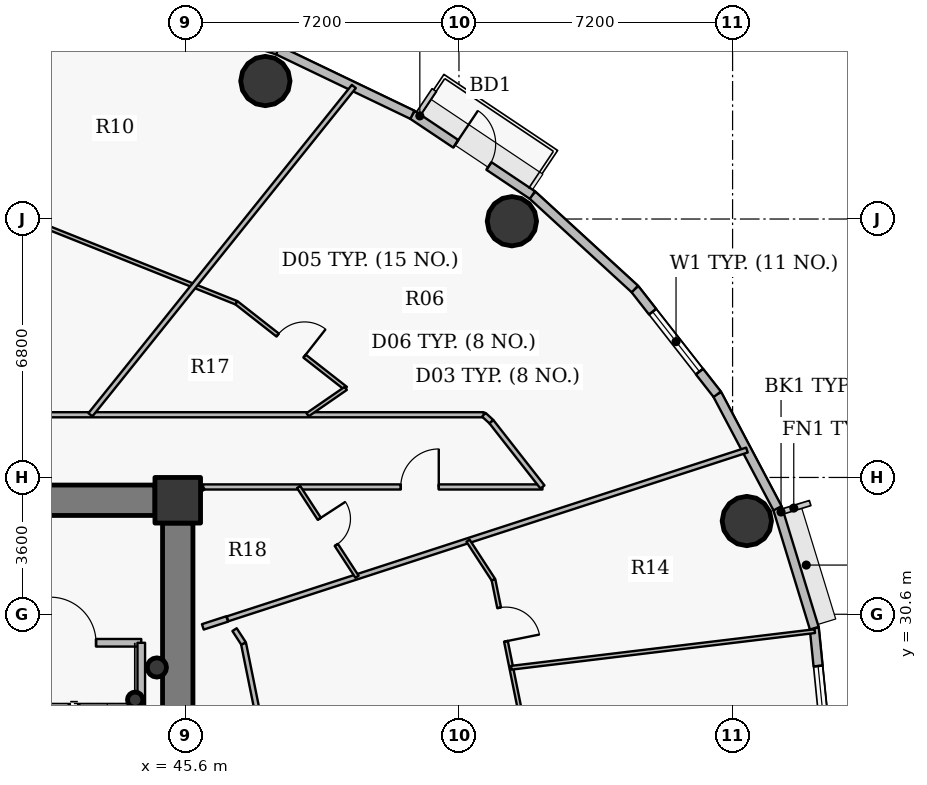
"""IFC4 building model, lengths in metres.
Left out: names, types, materials, properties, quantities, classifications, styles, units other than length and angle.
Written with IfcOpenShell. Run it as: python <this file> out.ifc"""

import sys

from ifc_helpers import new_model, si_unit, direction, frame, frame_2d, origin, origin_2d, place, context, subcontext, project, spatial, rectangle, hollow_circle, extrude, source, transform, mapped, element, fill, save


model = new_model("IFC4")
c1 = context("Model", 3, precision=1e-05, world=origin(), true_north=direction((0.0, 1.0)))
c2 = subcontext(c1, "Body", "Model", "MODEL_VIEW")
j1 = project(units=[si_unit("LENGTHUNIT", "METRE"), si_unit("PLANEANGLEUNIT", "RADIAN")], contexts=[c1])
p1 = place(None, origin())
s1 = spatial("IfcSite", under=j1, at=p1, CompositionType="ELEMENT")
p2 = place(p1, origin())
s2 = spatial("IfcBuilding", under=s1, at=p2, CompositionType="ELEMENT")
p3 = place(p2, frame((0.0, 0.0, 163.65)))
s3 = spatial("IfcBuildingStorey", under=s2, at=p3, CompositionType="ELEMENT", Elevation=163.65)
p4 = place(p3, frame((45.4, 33.6, 0.0), z_axis=(0.0, 0.0, 1.0), x_axis=(1.0, 0.0, 0.0)))
e1 = element("IfcColumn", 1, at=p4, inside=s3, PredefinedType="COLUMN", context=c2, shape_type="SweptSolid", body=[
    extrude(rectangle(XDim=1.2, YDim=1.2, at=origin_2d()), origin(), (0.0, 0.0, 1.0), 3.75),
])
p5 = place(p3, frame((44.28, 28.35, 0.0), z_axis=(0.0, 0.0, 1.0), x_axis=(1.0, 0.0, 0.0)))
e2 = element("IfcColumn", 2, at=p5, inside=s3, PredefinedType="COLUMN", context=c2, shape_type="SweptSolid", body=[
    extrude(hollow_circle(Radius=0.203, WallThickness=0.016, at=origin_2d()), origin(), (0.0, 0.0, 1.0), 3.75),
])
p6 = place(p3, frame((27.2, 33.6, 0.0), z_axis=(0.0, 0.0, 1.0), x_axis=(1.0, 0.0, 0.0)))
e3 = element("IfcWall", 3, at=p6, inside=s3, PredefinedType="SHEAR", context=c2, shape_type="SweptSolid", body=[
    extrude(rectangle(XDim=17.6, YDim=0.8, at=frame_2d((8.8, 0.0))), origin(), (0.0, 0.0, 1.0), 2.95),
])
p7 = place(p6, frame((13.45, 0.0, 0.0)))
e4 = element("IfcOpeningElement", 4, at=p7, cuts=e3, PredefinedType="OPENING", context=c2, shape_type="SweptSolid", body=[
    extrude(rectangle(XDim=1.15, YDim=2.15, at=origin_2d()), frame((0.575, 0.41, 1.075), z_axis=(0.0, -1.0, 0.0), x_axis=(1.0, 0.0, 0.0)), (0.0, 0.0, 1.0), 0.82),
])
p8 = place(p3, frame((45.4, 33.0, 0.0), z_axis=(0.0, 0.0, 1.0), x_axis=(0.0, -1.0, 0.0)))
e5 = element("IfcWall", 5, at=p8, inside=s3, PredefinedType="SHEAR", context=c2, shape_type="SweptSolid", body=[
    extrude(rectangle(XDim=12.0, YDim=0.8, at=frame_2d((6.0, 0.0))), origin(), (0.0, 0.0, 1.0), 2.95),
])
for number, where, z_axis, x_axis in (
    (6, (60.375, 33.053, 0.0), (0.0, 0.0, 1.0), (1.0, 0.0, 0.0)),
    (7, (54.192, 40.942, 0.0), (0.0, 0.0, 1.0), (1.0, 0.0, 0.0)),
    (8, (47.706, 44.631, 0.0), (0.0, 0.0, 1.0), (1.0, 0.0, 0.0)),
):
    element("IfcColumn", number, at=place(p3, frame(where, z_axis=z_axis, x_axis=x_axis)), inside=s3, PredefinedType="COLUMN", context=c2, shape_type="SweptSolid", body=[
        extrude(hollow_circle(Radius=0.65, WallThickness=0.04, at=origin_2d()), origin(), (0.0, 0.0, 1.0), 3.75),
    ])
p9 = place(p3, frame((44.85, 29.2, 0.0), z_axis=(0.0, 0.0, 1.0), x_axis=(1.0, 0.0, 0.0)))
e9 = element("IfcColumn", 9, at=p9, inside=s3, PredefinedType="COLUMN", context=c2, shape_type="SweptSolid", body=[
    extrude(hollow_circle(Radius=0.254, WallThickness=0.02, at=origin_2d()), origin(), (0.0, 0.0, 1.0), 3.75),
])
p10 = place(p3, frame((62.15, 30.234, 0.0), z_axis=(0.0, 0.0, 1.0), x_axis=(0.100061534614, -0.994981250723, 0.0)))
e10 = element("IfcWall", 10, at=p10, inside=s3, PredefinedType="SOLIDWALL", context=c2, shape_type="SweptSolid", body=[
    extrude(rectangle(XDim=3.25, YDim=0.24, at=frame_2d((1.625, 0.0))), origin(), (0.0, 0.0, 1.0), 3.5),
])
p11 = place(p10, frame((1.0, 0.0, 0.9)))
e11 = element("IfcOpeningElement", 11, at=p11, cuts=e10, PredefinedType="OPENING", context=c2, shape_type="SweptSolid", body=[
    extrude(rectangle(XDim=1.25, YDim=1.65, at=origin_2d()), frame((0.625, 0.13, 0.825), z_axis=(0.0, -1.0, 0.0), x_axis=(1.0, 0.0, 0.0)), (0.0, 0.0, 1.0), 0.26),
])
p12 = place(p3, frame((61.183, 33.389, 0.0), z_axis=(0.0, 0.0, 1.0), x_axis=(0.293097995113, -0.956082405058, 0.0)))
e12 = element("IfcWall", 12, at=p12, inside=s3, PredefinedType="SOLIDWALL", context=c2, shape_type="SweptSolid", body=[
    extrude(rectangle(XDim=3.3, YDim=0.24, at=frame_2d((1.65, 0.0))), origin(), (0.0, 0.0, 1.0), 3.5),
])
p13 = place(p3, frame((59.596, 36.388, 0.0), z_axis=(0.0, 0.0, 1.0), x_axis=(0.467586874938, -0.88394712194, 0.0)))
e13 = element("IfcWall", 13, at=p13, inside=s3, PredefinedType="SOLIDWALL", context=c2, shape_type="SweptSolid", body=[
    extrude(rectangle(XDim=3.393, YDim=0.24, at=frame_2d((1.697, 0.0))), origin(), (0.0, 0.0, 1.0), 3.5),
])
p14 = place(p3, frame((57.428, 39.158, 0.0), z_axis=(0.0, 0.0, 1.0), x_axis=(0.616287674549, -0.787521112224, 0.0)))
e14 = element("IfcWall", 14, at=p14, inside=s3, PredefinedType="SOLIDWALL", context=c2, shape_type="SweptSolid", body=[
    extrude(rectangle(XDim=3.517, YDim=0.24, at=frame_2d((1.759, 0.0))), origin(), (0.0, 0.0, 1.0), 3.5),
])
p15 = place(p14, frame((0.759, 0.0, 0.9)))
e15 = element("IfcOpeningElement", 15, at=p15, cuts=e14, PredefinedType="OPENING", context=c2, shape_type="SweptSolid", body=[
    extrude(rectangle(XDim=2.0, YDim=1.75, at=origin_2d()), frame((1.0, 0.13, 0.875), z_axis=(0.0, -1.0, 0.0), x_axis=(1.0, 0.0, 0.0)), (0.0, 0.0, 1.0), 0.26),
])
p16 = place(p3, frame((54.732, 41.631, 0.0), z_axis=(0.0, 0.0, 1.0), x_axis=(0.737076565834, -0.675809245349, 0.0)))
e16 = element("IfcWall", 16, at=p16, inside=s3, PredefinedType="SOLIDWALL", context=c2, shape_type="SweptSolid", body=[
    extrude(rectangle(XDim=3.658, YDim=0.24, at=frame_2d((1.829, 0.0))), origin(), (0.0, 0.0, 1.0), 3.5),
])
p17 = place(p3, frame((51.573, 43.743, 0.0), z_axis=(0.0, 0.0, 1.0), x_axis=(0.831228998277, -0.555930168657, 0.0)))
e17 = element("IfcWall", 17, at=p17, inside=s3, PredefinedType="SOLIDWALL", context=c2, shape_type="SweptSolid", body=[
    extrude(rectangle(XDim=3.8, YDim=0.24, at=frame_2d((1.9, 0.0))), origin(), (0.0, 0.0, 1.0), 3.5),
])
p18 = place(p17, frame((1.375, 0.0, 0.0)))
e18 = element("IfcOpeningElement", 18, at=p18, cuts=e17, PredefinedType="OPENING", context=c2, shape_type="SweptSolid", body=[
    extrude(rectangle(XDim=1.05, YDim=2.15, at=origin_2d()), frame((0.525, 0.13, 1.075), z_axis=(0.0, -1.0, 0.0), x_axis=(1.0, 0.0, 0.0)), (0.0, 0.0, 1.0), 0.26),
])
p19 = place(p3, frame((48.03, 45.444, 0.0), z_axis=(0.0, 0.0, 1.0), x_axis=(0.901564733809, -0.432644231155, 0.0)))
e19 = element("IfcWall", 19, at=p19, inside=s3, PredefinedType="SOLIDWALL", context=c2, shape_type="SweptSolid", body=[
    extrude(rectangle(XDim=3.93, YDim=0.24, at=frame_2d((1.965, 0.0))), origin(), (0.0, 0.0, 1.0), 3.5),
])
p20 = place(p3, frame((44.189, 46.689, 0.0), z_axis=(0.0, 0.0, 1.0), x_axis=(0.951209870236, -0.30854462038, 0.0)))
e20 = element("IfcWall", 20, at=p20, inside=s3, PredefinedType="SOLIDWALL", context=c2, shape_type="SweptSolid", body=[
    extrude(rectangle(XDim=4.038, YDim=0.24, at=frame_2d((2.019, 0.0))), origin(), (0.0, 0.0, 1.0), 3.5),
])
p21 = place(p20, frame((1.019, 0.0, 0.9)))
e21 = element("IfcOpeningElement", 21, at=p21, cuts=e20, PredefinedType="OPENING", context=c2, shape_type="SweptSolid", body=[
    extrude(rectangle(XDim=2.0, YDim=1.75, at=origin_2d()), frame((1.0, 0.13, 0.875), z_axis=(0.0, -1.0, 0.0), x_axis=(1.0, 0.0, 0.0)), (0.0, 0.0, 1.0), 0.26),
])
p22 = place(p3, frame((24.35, 35.85, 0.0), z_axis=(0.0, 0.0, 1.0), x_axis=(1.0, 0.0, 0.0)))
e22 = element("IfcWall", 22, at=p22, inside=s3, PredefinedType="PARTITIONING", context=c2, shape_type="SweptSolid", body=[
    extrude(rectangle(XDim=29.104, YDim=0.135, at=frame_2d((14.552, 0.0))), origin(), (0.0, 0.0, 1.0), 2.935),
])
p23 = place(p22, frame((15.972, 0.0, 0.0)))
e23 = element("IfcOpeningElement", 23, at=p23, cuts=e22, PredefinedType="OPENING", context=c2, shape_type="SweptSolid", body=[
    extrude(rectangle(XDim=1.0, YDim=2.15, at=origin_2d()), frame((0.5, 0.078, 1.075), z_axis=(0.0, -1.0, 0.0), x_axis=(1.0, 0.0, 0.0)), (0.0, 0.0, 1.0), 0.155),
])
p24 = place(p22, frame((4.074, 0.0, 0.0)))
e24 = element("IfcOpeningElement", 24, at=p24, cuts=e22, PredefinedType="OPENING", context=c2, shape_type="SweptSolid", body=[
    extrude(rectangle(XDim=1.0, YDim=2.15, at=origin_2d()), frame((0.5, 0.078, 1.075), z_axis=(0.0, -1.0, 0.0), x_axis=(1.0, 0.0, 0.0)), (0.0, 0.0, 1.0), 0.155),
])
p25 = place(p3, frame((35.95, 29.85, 0.0), z_axis=(0.0, 0.0, 1.0), x_axis=(1.0, 0.0, 0.0)))
e25 = element("IfcWall", 25, at=p25, inside=s3, PredefinedType="PARTITIONING", context=c2, shape_type="SweptSolid", body=[
    extrude(rectangle(XDim=8.49, YDim=0.2, at=frame_2d((4.245, 0.0))), origin(), (0.0, 0.0, 1.0), 3.085),
])
p26 = place(p25, frame((6.1, 0.0, 0.0)))
e26 = element("IfcOpeningElement", 26, at=p26, cuts=e25, PredefinedType="OPENING", context=c2, shape_type="SweptSolid", body=[
    extrude(rectangle(XDim=1.2, YDim=2.15, at=origin_2d()), frame((0.6, 0.11, 1.075), z_axis=(0.0, -1.0, 0.0), x_axis=(1.0, 0.0, 0.0)), (0.0, 0.0, 1.0), 0.22),
])
p27 = place(p25, frame((0.37, 0.0, 0.0)))
e27 = element("IfcOpeningElement", 27, at=p27, cuts=e25, PredefinedType="OPENING", context=c2, shape_type="SweptSolid", body=[
    extrude(rectangle(XDim=1.15, YDim=2.15, at=origin_2d()), frame((0.575, 0.11, 1.075), z_axis=(0.0, -1.0, 0.0), x_axis=(1.0, 0.0, 0.0)), (0.0, 0.0, 1.0), 0.22),
])
p28 = place(p25, frame((2.425, 0.0, 0.0)))
e28 = element("IfcOpeningElement", 28, at=p28, cuts=e25, PredefinedType="OPENING", context=c2, shape_type="SweptSolid", body=[
    extrude(rectangle(XDim=1.05, YDim=2.15, at=origin_2d()), frame((0.525, 0.11, 1.075), z_axis=(0.0, -1.0, 0.0), x_axis=(1.0, 0.0, 0.0)), (0.0, 0.0, 1.0), 0.22),
])
p29 = place(p3, frame((41.754, 40.867, 0.0), z_axis=(0.0, 0.0, 1.0), x_axis=(0.928789673623, -0.370607261359, 0.0)))
e29 = element("IfcWall", 29, at=p29, inside=s3, PredefinedType="PARTITIONING", context=c2, shape_type="SweptSolid", body=[
    extrude(rectangle(XDim=5.589, YDim=0.1, at=frame_2d((2.794, 0.0))), origin(), (0.0, 0.0, 1.0), 2.935),
])
p30 = place(p3, frame((43.102, 35.85, 0.0), z_axis=(0.0, 0.0, 1.0), x_axis=(0.62588794771, 0.779912993168, 0.0)))
e30 = element("IfcWall", 30, at=p30, inside=s3, PredefinedType="PARTITIONING", context=c2, shape_type="SweptSolid", body=[
    extrude(rectangle(XDim=11.075, YDim=0.135, at=frame_2d((5.538, 0.0))), origin(), (0.0, 0.0, 1.0), 2.935),
])
p31 = place(p3, frame((44.44, 21.33, 0.0), z_axis=(0.0, 0.0, 1.0), x_axis=(0.0, 1.0, 0.0)))
e31 = element("IfcWall", 31, at=p31, inside=s3, PredefinedType="PARTITIONING", context=c2, shape_type="SweptSolid", body=[
    extrude(rectangle(XDim=8.52, YDim=0.2, at=frame_2d((4.26, 0.0))), origin(), (0.0, 0.0, 1.0), 3.5),
])
p32 = place(p3, frame((46.065, 33.95, 0.0), z_axis=(0.0, 0.0, 1.0), x_axis=(1.0, 0.0, 0.0)))
e32 = element("IfcWall", 32, at=p32, inside=s3, PredefinedType="PARTITIONING", context=c2, shape_type="SweptSolid", body=[
    extrude(rectangle(XDim=8.932, YDim=0.135, at=frame_2d((4.466, 0.0))), origin(), (0.0, 0.0, 1.0), 3.5),
])
p33 = place(p32, frame((5.204, 0.0, 0.0)))
e33 = element("IfcOpeningElement", 33, at=p33, cuts=e32, PredefinedType="OPENING", context=c2, shape_type="SweptSolid", body=[
    extrude(rectangle(XDim=1.0, YDim=2.15, at=origin_2d()), frame((0.5, 0.078, 1.075), z_axis=(0.0, -1.0, 0.0), x_axis=(1.0, 0.0, 0.0)), (0.0, 0.0, 1.0), 0.155),
])
p34 = place(p3, frame((46.71, 30.48, 0.0), z_axis=(0.0, 0.0, 1.0), x_axis=(0.951054665008, 0.309022691992, 0.0)))
e34 = element("IfcWall", 34, at=p34, inside=s3, PredefinedType="PARTITIONING", context=c2, shape_type="SweptSolid", body=[
    extrude(rectangle(XDim=14.372, YDim=0.135, at=frame_2d((7.186, 0.0))), origin(), (0.0, 0.0, 1.0), 2.935),
])
p35 = place(p3, frame((46.945, 38.796, 0.0), z_axis=(0.0, 0.0, 1.0), x_axis=(0.787307530322, -0.616560502058, 0.0)))
e35 = element("IfcWall", 35, at=p35, inside=s3, PredefinedType="PARTITIONING", context=c2, shape_type="SweptSolid", body=[
    extrude(rectangle(XDim=3.653, YDim=0.1, at=frame_2d((1.827, 0.0))), origin(), (0.0, 0.0, 1.0), 2.935),
])
p36 = place(p35, frame((1.377, 0.0, 0.0)))
e36 = element("IfcOpeningElement", 36, at=p36, cuts=e35, PredefinedType="OPENING", context=c2, shape_type="SweptSolid", body=[
    extrude(rectangle(XDim=0.9, YDim=2.1, at=origin_2d()), frame((0.45, 0.06, 1.05), z_axis=(0.0, -1.0, 0.0), x_axis=(1.0, 0.0, 0.0)), (0.0, 0.0, 1.0), 0.12),
])
p37 = place(p3, frame((48.58, 33.95, 0.0), z_axis=(0.0, 0.0, 1.0), x_axis=(0.545393120499, -0.838180376836, 0.0)))
e37 = element("IfcWall", 37, at=p37, inside=s3, PredefinedType="PARTITIONING", context=c2, shape_type="SweptSolid", body=[
    extrude(rectangle(XDim=2.819, YDim=0.1, at=frame_2d((1.41, 0.0))), origin(), (0.0, 0.0, 1.0), 3.5),
])
p38 = place(p37, frame((1.0, 0.0, 0.0)))
e38 = element("IfcOpeningElement", 38, at=p38, cuts=e37, PredefinedType="OPENING", context=c2, shape_type="SweptSolid", body=[
    extrude(rectangle(XDim=0.82, YDim=2.1, at=origin_2d()), frame((0.41, 0.06, 1.05), z_axis=(0.0, -1.0, 0.0), x_axis=(1.0, 0.0, 0.0)), (0.0, 0.0, 1.0), 0.12),
])
p39 = place(p3, frame((48.816, 35.85, 0.0), z_axis=(0.0, 0.0, 1.0), x_axis=(0.822832340307, 0.568284206841, 0.0)))
e39 = element("IfcWall", 39, at=p39, inside=s3, PredefinedType="PARTITIONING", context=c2, shape_type="SweptSolid", body=[
    extrude(rectangle(XDim=1.221, YDim=0.1, at=frame_2d((0.61, 0.0))), origin(), (0.0, 0.0, 1.0), 3.5),
])
p40 = place(p3, frame((53.038, 32.536, 0.0), z_axis=(0.0, 0.0, 1.0), x_axis=(0.545407162254, -0.83817123988, 0.0)))
e40 = element("IfcWall", 40, at=p40, inside=s3, PredefinedType="PARTITIONING", context=c2, shape_type="SweptSolid", body=[
    extrude(rectangle(XDim=1.229, YDim=0.1, at=frame_2d((0.615, 0.0))), origin(), (0.0, 0.0, 1.0), 2.935),
])
p41 = place(p3, frame((53.454, 35.85, 0.0), z_axis=(0.0, 0.0, 1.0), x_axis=(0.736667385572, -0.676255249913, 0.0)))
e41 = element("IfcWall", 41, at=p41, inside=s3, PredefinedType="PARTITIONING", context=c2, shape_type="SweptSolid", body=[
    extrude(rectangle(XDim=0.271, YDim=0.135, at=frame_2d((0.135, 0.0))), origin(), (0.0, 0.0, 1.0), 3.5),
])
p42 = place(p3, frame((53.653, 35.667, 0.0), z_axis=(0.0, 0.0, 1.0), x_axis=(0.616302223209, -0.787509726713, 0.0)))
e42 = element("IfcWall", 42, at=p42, inside=s3, PredefinedType="PARTITIONING", context=c2, shape_type="SweptSolid", body=[
    extrude(rectangle(XDim=2.18, YDim=0.135, at=frame_2d((1.09, 0.0))), origin(), (0.0, 0.0, 1.0), 3.5),
])
p43 = place(p3, frame((53.709, 31.506, 0.0), z_axis=(0.0, 0.0, 1.0), x_axis=(0.198209478932, -0.980159682124, 0.0)))
e43 = element("IfcWall", 43, at=p43, inside=s3, PredefinedType="PARTITIONING", context=c2, shape_type="SweptSolid", body=[
    extrude(rectangle(XDim=4.597, YDim=0.1, at=frame_2d((2.298, 0.0))), origin(), (0.0, 0.0, 1.0), 2.935),
])
p44 = place(p43, frame((0.75, 0.0, 0.0)))
e44 = element("IfcOpeningElement", 44, at=p44, cuts=e43, PredefinedType="OPENING", context=c2, shape_type="SweptSolid", body=[
    extrude(rectangle(XDim=0.9, YDim=2.1, at=origin_2d()), frame((0.45, 0.06, 1.05), z_axis=(0.0, -1.0, 0.0), x_axis=(1.0, 0.0, 0.0)), (0.0, 0.0, 1.0), 0.12),
])
p45 = place(p3, frame((54.177, 29.193, 0.0), z_axis=(0.0, 0.0, 1.0), x_axis=(0.992799222866, 0.119790246168, 0.0)))
e45 = element("IfcWall", 45, at=p45, inside=s3, PredefinedType="PARTITIONING", context=c2, shape_type="SweptSolid", body=[
    extrude(rectangle(XDim=8.044, YDim=0.1, at=frame_2d((4.022, 0.0))), origin(), (0.0, 0.0, 1.0), 2.935),
])
p46 = place(p3, frame((45.8, 34.0, 0.0), z_axis=(0.0, 0.0, 1.0), x_axis=(-1.0, 0.0, 0.0)))
e46 = element("IfcWall", 46, at=p46, inside=s3, PredefinedType="PARTITIONING", context=c2, shape_type="SweptSolid", body=[
    extrude(rectangle(XDim=0.99, YDim=0.135, at=frame_2d((0.495, 0.0))), origin(), (0.0, 0.0, 1.0), 2.935),
])
p47 = place(p3, frame((45.8, 33.01, 0.0), z_axis=(0.0, 0.0, 1.0), x_axis=(0.0, 1.0, 0.0)))
e47 = element("IfcWall", 47, at=p47, inside=s3, PredefinedType="PARTITIONING", context=c2, shape_type="SweptSolid", body=[
    extrude(rectangle(XDim=0.682, YDim=0.15, at=frame_2d((0.341, 0.0))), origin(), (0.0, 0.0, 1.0), 3.5),
])
p48 = place(p3, frame((45.8, 33.767, 0.0), z_axis=(0.0, 0.0, 1.0), x_axis=(0.823065918238, 0.56794585502, 0.0)))
e48 = element("IfcWall", 48, at=p48, inside=s3, PredefinedType="PARTITIONING", context=c2, shape_type="SweptSolid", body=[
    extrude(rectangle(XDim=0.322, YDim=0.15, at=frame_2d((0.161, 0.0))), origin(), (0.0, 0.0, 1.0), 3.5),
])
p49 = place(p3, frame((46.7, 30.477, 0.0), z_axis=(0.0, 0.0, 1.0), x_axis=(-0.951050060735, -0.309036861841, 0.0)))
e49 = element("IfcWall", 49, at=p49, inside=s3, PredefinedType="PARTITIONING", context=c2, shape_type="SweptSolid", body=[
    extrude(rectangle(XDim=0.673, YDim=0.15, at=frame_2d((0.336, 0.0))), origin(), (0.0, 0.0, 1.0), 3.5),
])
p50 = place(p3, frame((47.704, 27.0, 0.0), z_axis=(0.0, 0.0, 1.0), x_axis=(-0.198292837027, 0.980142821625, 0.0)))
e50 = element("IfcWall", 50, at=p50, inside=s3, PredefinedType="PARTITIONING", context=c2, shape_type="SweptSolid", body=[
    extrude(rectangle(XDim=2.89, YDim=0.135, at=frame_2d((1.445, 0.0))), origin(), (0.0, 0.0, 1.0), 2.935),
])
p51 = place(p3, frame((47.131, 29.832, 0.0), z_axis=(0.0, 0.0, 1.0), x_axis=(-0.545305123916, 0.838237628499, 0.0)))
e51 = element("IfcWall", 51, at=p51, inside=s3, PredefinedType="PARTITIONING", context=c2, shape_type="SweptSolid", body=[
    extrude(rectangle(XDim=0.433, YDim=0.135, at=frame_2d((0.217, 0.0))), origin(), (0.0, 0.0, 1.0), 2.935),
])
m1 = source(origin(), c2, "Body", "SweptSolid", [
    extrude(rectangle(XDim=2.0, YDim=1.75, at=origin_2d()), frame((1.0, 0.03, 0.875), z_axis=(0.0, -1.0, 0.0), x_axis=(1.0, 0.0, 0.0)), (0.0, 0.0, 1.0), 0.06),
])
p52 = place(p15, origin())
e52 = element("IfcWindow", 52, at=p52, inside=s3, PartitioningType="DOUBLE_PANEL_VERTICAL", PredefinedType="WINDOW", context=c2, shape_type="MappedRepresentation", body=[
    mapped(m1, transform((0.0, 0.0, 0.0), x_axis=(1.0, 0.0, 0.0), y_axis=(0.0, 1.0, 0.0), z_axis=(0.0, 0.0, 1.0), scale=1.0)),
])
fill(e15, e52)
m2 = source(origin(), c2, "Body", "SweptSolid", [
    extrude(rectangle(XDim=1.05, YDim=2.15, at=origin_2d()), frame((0.525, 0.025, 1.075), z_axis=(0.0, -1.0, 0.0), x_axis=(1.0, 0.0, 0.0)), (0.0, 0.0, 1.0), 0.05),
])
p53 = place(p18, origin())
e53 = element("IfcDoor", 53, at=p53, inside=s3, OperationType="SINGLE_SWING_LEFT", PredefinedType="DOOR", context=c2, shape_type="MappedRepresentation", body=[
    mapped(m2, transform((0.0, 0.0, 0.0), x_axis=(1.0, 0.0, 0.0), y_axis=(0.0, 1.0, 0.0), z_axis=(0.0, 0.0, 1.0), scale=1.0)),
])
fill(e18, e53)
m3 = source(origin(), c2, "Body", "SweptSolid", [
    extrude(rectangle(XDim=1.25, YDim=1.65, at=origin_2d()), frame((0.625, 0.03, 0.825), z_axis=(0.0, -1.0, 0.0), x_axis=(1.0, 0.0, 0.0)), (0.0, 0.0, 1.0), 0.06),
])
p54 = place(p11, origin())
e54 = element("IfcWindow", 54, at=p54, inside=s3, PartitioningType="SINGLE_PANEL", PredefinedType="WINDOW", context=c2, shape_type="MappedRepresentation", body=[
    mapped(m3, transform((0.0, 0.0, 0.0), x_axis=(1.0, 0.0, 0.0), y_axis=(0.0, 1.0, 0.0), z_axis=(0.0, 0.0, 1.0), scale=1.0)),
])
fill(e11, e54)
m4 = source(origin(), c2, "Body", "SweptSolid", [
    extrude(rectangle(XDim=1.2, YDim=2.15, at=origin_2d()), frame((0.6, 0.025, 1.075), z_axis=(0.0, -1.0, 0.0), x_axis=(1.0, 0.0, 0.0)), (0.0, 0.0, 1.0), 0.05),
])
p55 = place(p26, origin())
e55 = element("IfcDoor", 55, at=p55, inside=s3, OperationType="SINGLE_SWING_LEFT", PredefinedType="DOOR", context=c2, shape_type="MappedRepresentation", body=[
    mapped(m4, transform((0.0, 0.0, 0.0), x_axis=(1.0, 0.0, 0.0), y_axis=(0.0, 1.0, 0.0), z_axis=(0.0, 0.0, 1.0), scale=1.0)),
])
fill(e26, e55)
m5 = source(origin(), c2, "Body", "SweptSolid", [
    extrude(rectangle(XDim=1.0, YDim=2.15, at=origin_2d()), frame((0.5, 0.025, 1.075), z_axis=(0.0, -1.0, 0.0), x_axis=(1.0, 0.0, 0.0)), (0.0, 0.0, 1.0), 0.05),
])
p56 = place(p33, origin())
e56 = element("IfcDoor", 56, at=p56, inside=s3, OperationType="SINGLE_SWING_RIGHT", PredefinedType="DOOR", context=c2, shape_type="MappedRepresentation", body=[
    mapped(m5, transform((0.0, 0.0, 0.0), x_axis=(1.0, 0.0, 0.0), y_axis=(0.0, 1.0, 0.0), z_axis=(0.0, 0.0, 1.0), scale=1.0)),
])
fill(e33, e56)
m6 = source(origin(), c2, "Body", "SweptSolid", [
    extrude(rectangle(XDim=0.82, YDim=2.1, at=origin_2d()), frame((0.41, 0.025, 1.05), z_axis=(0.0, -1.0, 0.0), x_axis=(1.0, 0.0, 0.0)), (0.0, 0.0, 1.0), 0.05),
])
p57 = place(p38, origin())
e57 = element("IfcDoor", 57, at=p57, inside=s3, OperationType="SINGLE_SWING_LEFT", PredefinedType="DOOR", context=c2, shape_type="MappedRepresentation", body=[
    mapped(m6, transform((0.0, 0.0, 0.0), x_axis=(1.0, 0.0, 0.0), y_axis=(0.0, 1.0, 0.0), z_axis=(0.0, 0.0, 1.0), scale=1.0)),
])
fill(e38, e57)
m7 = source(origin(), c2, "Body", "SweptSolid", [
    extrude(rectangle(XDim=0.9, YDim=2.1, at=origin_2d()), frame((0.45, 0.025, 1.05), z_axis=(0.0, -1.0, 0.0), x_axis=(1.0, 0.0, 0.0)), (0.0, 0.0, 1.0), 0.05),
])
p58 = place(p36, origin())
e58 = element("IfcDoor", 58, at=p58, inside=s3, OperationType="SINGLE_SWING_RIGHT", PredefinedType="DOOR", context=c2, shape_type="MappedRepresentation", body=[
    mapped(m7, transform((0.0, 0.0, 0.0), x_axis=(1.0, 0.0, 0.0), y_axis=(0.0, 1.0, 0.0), z_axis=(0.0, 0.0, 1.0), scale=1.0)),
])
fill(e36, e58)
p59 = place(p44, origin())
e59 = element("IfcDoor", 59, at=p59, inside=s3, OperationType="SINGLE_SWING_RIGHT", PredefinedType="DOOR", context=c2, shape_type="MappedRepresentation", body=[
    mapped(m7, transform((0.0, 0.0, 0.0), x_axis=(1.0, 0.0, 0.0), y_axis=(0.0, 1.0, 0.0), z_axis=(0.0, 0.0, 1.0), scale=1.0)),
])
fill(e44, e59)
save(model, sys.argv[1])
